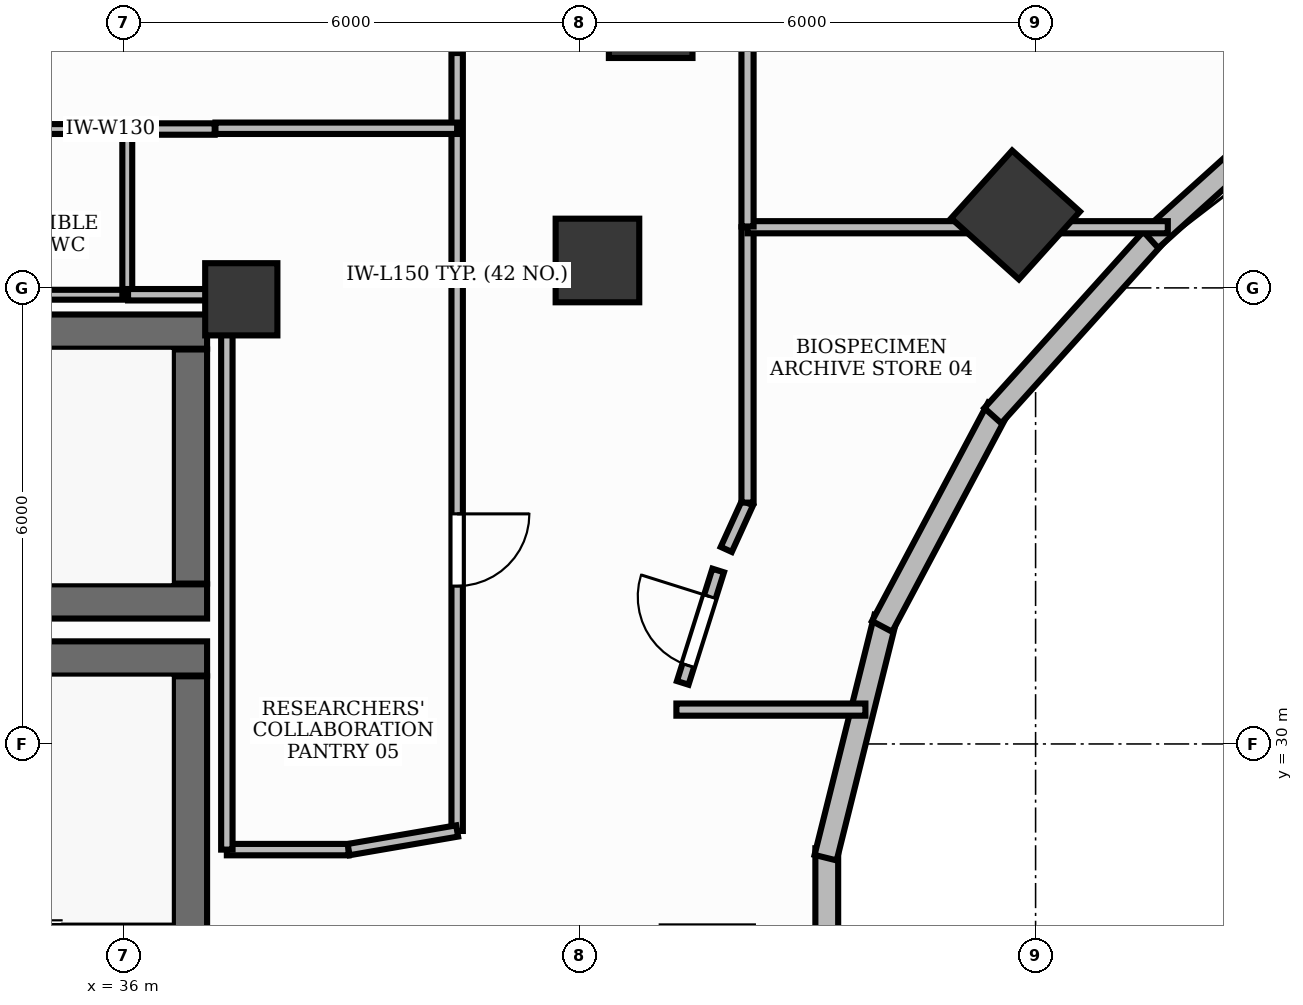
"""IFC4 building model, lengths in metres.
Left out: names, types, materials, properties, quantities, classifications, styles, units other than length and angle.
Written with IfcOpenShell. Run it as: python <this file> out.ifc"""

import sys

from ifc_helpers import new_model, si_unit, direction, frame, frame_2d, origin, origin_2d, place, context, subcontext, project, spatial, rectangle, extrude, element, fill, save


model = new_model("IFC4")
c1 = context("Model", 3, precision=1e-05, world=origin(), true_north=direction((0.0, 1.0)))
c2 = subcontext(c1, "Body", "Model", "MODEL_VIEW")
j1 = project(units=[si_unit("LENGTHUNIT", "METRE"), si_unit("PLANEANGLEUNIT", "RADIAN")], contexts=[c1])
p1 = place(None, origin())
s1 = spatial("IfcSite", under=j1, at=p1, CompositionType="ELEMENT")
p2 = place(p1, origin())
s2 = spatial("IfcBuilding", under=s1, at=p2, CompositionType="ELEMENT")
p3 = place(p2, frame((0.0, 0.0, 102.6)))
s3 = spatial("IfcBuildingStorey", under=s2, at=p3, CompositionType="ELEMENT", Elevation=102.6)
p4 = place(p3, frame((28.852, 35.425, 0.0), z_axis=(0.0, 0.0, 1.0), x_axis=(1.0, 0.0, 0.0)))
e1 = element("IfcWall", 1, at=p4, inside=s3, PredefinedType="SHEAR", context=c2, shape_type="SweptSolid", body=[
    extrude(rectangle(XDim=8.248, YDim=0.45, at=frame_2d((4.124, 0.0))), origin(), (0.0, 0.0, 1.0), 3.9),
])
p5 = place(p3, frame((28.35, 31.875, 0.0), z_axis=(0.0, 0.0, 1.0), x_axis=(1.0, 0.0, 0.0)))
e2 = element("IfcWall", 2, at=p5, inside=s3, PredefinedType="SHEAR", context=c2, shape_type="SweptSolid", body=[
    extrude(rectangle(XDim=8.75, YDim=0.45, at=frame_2d((4.375, 0.0))), origin(), (0.0, 0.0, 1.0), 3.9),
])
p6 = place(p3, frame((36.875, 32.11, 0.0), z_axis=(0.0, 0.0, 1.0), x_axis=(0.0, 1.0, 0.0)))
e3 = element("IfcWall", 3, at=p6, inside=s3, PredefinedType="SHEAR", context=c2, shape_type="SweptSolid", body=[
    extrude(rectangle(XDim=3.08, YDim=0.45, at=frame_2d((1.54, 0.0))), origin(), (0.0, 0.0, 1.0), 3.9),
])
p7 = place(p3, frame((33.1, 31.125, 0.0), z_axis=(0.0, 0.0, 1.0), x_axis=(1.0, 0.0, 0.0)))
e4 = element("IfcWall", 4, at=p7, inside=s3, PredefinedType="SHEAR", context=c2, shape_type="SweptSolid", body=[
    extrude(rectangle(XDim=4.0, YDim=0.45, at=frame_2d((2.0, 0.0))), origin(), (0.0, 0.0, 1.0), 3.9),
])
p8 = place(p3, frame((36.875, 23.11, 0.0), z_axis=(0.0, 0.0, 1.0), x_axis=(0.0, 1.0, 0.0)))
e5 = element("IfcWall", 5, at=p8, inside=s3, PredefinedType="SHEAR", context=c2, shape_type="SweptSolid", body=[
    extrude(rectangle(XDim=7.78, YDim=0.45, at=frame_2d((3.89, 0.0))), origin(), (0.0, 0.0, 1.0), 3.9),
])
p9 = place(p3, frame((37.55, 35.85, -0.0), z_axis=(0.0, 0.0, 1.0), x_axis=(1.0, 0.0, 0.0)))
e6 = element("IfcColumn", 6, at=p9, inside=s3, PredefinedType="PILASTER", context=c2, shape_type="SweptSolid", body=[
    extrude(rectangle(XDim=0.95, YDim=0.95, at=origin_2d()), origin(), (0.0, 0.0, 1.0), 3.901),
])
p10 = place(p3, frame((42.936, 39.575, -0.0), z_axis=(0.0, 0.0, 1.0), x_axis=(1.0, 0.0, 0.0)))
e7 = element("IfcColumn", 7, at=p10, inside=s3, PredefinedType="COLUMN", context=c2, shape_type="SweptSolid", body=[
    extrude(rectangle(XDim=1.1, YDim=1.1, at=origin_2d()), origin(), (0.0, 0.0, 1.0), 3.901),
])
p11 = place(p3, frame((47.736, 36.96, -0.0), z_axis=(0.0, 0.0, 1.0), x_axis=(0.669130606359, 0.743144825477, 0.0)))
e8 = element("IfcColumn", 8, at=p11, inside=s3, PredefinedType="COLUMN", context=c2, shape_type="SweptSolid", body=[
    extrude(rectangle(XDim=1.2, YDim=1.2, at=origin_2d()), origin(), (0.0, 0.0, 1.0), 3.901),
])
p12 = place(p3, frame((42.236, 36.361, -0.0), z_axis=(0.0, 0.0, 1.0), x_axis=(1.0, 0.0, 0.0)))
e9 = element("IfcColumn", 9, at=p12, inside=s3, PredefinedType="COLUMN", context=c2, shape_type="SweptSolid", body=[
    extrude(rectangle(XDim=1.1, YDim=1.1, at=origin_2d()), origin(), (0.0, 0.0, 1.0), 3.901),
])
p13 = place(p3, frame((45.253, 25.372, 0.0), z_axis=(0.0, 0.0, 1.0), x_axis=(0.0, 1.0, 0.0)))
e10 = element("IfcWall", 10, at=p13, inside=s3, PredefinedType="STANDARD", context=c2, shape_type="SweptSolid", body=[
    extrude(rectangle(XDim=3.255, YDim=0.3, at=frame_2d((1.628, 0.0))), origin(), (0.0, 0.0, 1.0), 3.9),
])
p14 = place(p3, frame((45.238, 28.504, 0.0), z_axis=(0.0, 0.0, 1.0), x_axis=(0.241900409149, 0.970301083197, 0.0)))
e11 = element("IfcWall", 11, at=p14, inside=s3, PredefinedType="STANDARD", context=c2, shape_type="SweptSolid", body=[
    extrude(rectangle(XDim=3.256, YDim=0.3, at=frame_2d((1.628, 0.0))), origin(), (0.0, 0.0, 1.0), 3.9),
])
p15 = place(p3, frame((45.98, 31.547, 0.0), z_axis=(0.0, 0.0, 1.0), x_axis=(0.469451284634, 0.882958374645, 0.0)))
e12 = element("IfcWall", 12, at=p15, inside=s3, PredefinedType="STANDARD", context=c2, shape_type="SweptSolid", body=[
    extrude(rectangle(XDim=3.256, YDim=0.3, at=frame_2d((1.628, 0.0))), origin(), (0.0, 0.0, 1.0), 3.9),
])
p16 = place(p3, frame((47.437, 34.319, 0.0), z_axis=(0.0, 0.0, 1.0), x_axis=(0.669167727967, 0.743111399353, 0.0)))
e13 = element("IfcWall", 13, at=p16, inside=s3, PredefinedType="STANDARD", context=c2, shape_type="SweptSolid", body=[
    extrude(rectangle(XDim=3.255, YDim=0.3, at=frame_2d((1.628, 0.0))), origin(), (0.0, 0.0, 1.0), 3.9),
])
p17 = place(p3, frame((49.513, 36.636, 0.0), z_axis=(0.0, 0.0, 1.0), x_axis=(0.74255963233, 0.669779958221, 0.0)))
e14 = element("IfcWall", 14, at=p17, inside=s3, PredefinedType="STANDARD", context=c2, shape_type="SweptSolid", body=[
    extrude(rectangle(XDim=3.539, YDim=0.3, at=frame_2d((1.77, 0.0))), origin(), (0.0, 0.0, 1.0), 3.9),
])
p18 = place(p3, frame((33.65, 38.09, 0.0), z_axis=(0.0, 0.0, 1.0), x_axis=(1.0, 0.0, 0.0)))
e15 = element("IfcWall", 15, at=p18, inside=s3, PredefinedType="PARTITIONING", context=c2, shape_type="SweptSolid", body=[
    extrude(rectangle(XDim=2.4, YDim=0.13, at=frame_2d((1.2, 0.0))), origin(), (0.0, 0.0, 1.0), 2.91),
])
p19 = place(p18, frame((0.24, 0.0, 0.0)))
e16 = element("IfcOpeningElement", 16, at=p19, cuts=e15, PredefinedType="OPENING", context=c2, shape_type="SweptSolid", body=[
    extrude(rectangle(XDim=0.9, YDim=2.15, at=frame_2d((0.45, 1.075))), frame((0.0, 0.08, 0.0), z_axis=(0.0, -1.0, 0.0), x_axis=(1.0, 0.0, 0.0)), (0.0, 0.0, 1.0), 0.16),
])
p20 = place(p3, frame((43.358, 30.803, 0.0), z_axis=(0.0, 0.0, 1.0), x_axis=(0.300641414783, 0.953737248783, 0.0)))
e17 = element("IfcWall", 17, at=p20, inside=s3, PredefinedType="PARTITIONING", context=c2, shape_type="SweptSolid", body=[
    extrude(rectangle(XDim=1.55, YDim=0.16, at=frame_2d((0.775, 0.0))), origin(), (0.0, 0.0, 1.0), 2.91),
])
p21 = place(p20, frame((0.24, 0.0, 0.0)))
e18 = element("IfcOpeningElement", 18, at=p21, cuts=e17, PredefinedType="OPENING", context=c2, shape_type="SweptSolid", body=[
    extrude(rectangle(XDim=0.95, YDim=2.15, at=frame_2d((0.475, 1.075))), frame((0.0, 0.095, 0.0), z_axis=(0.0, -1.0, 0.0), x_axis=(1.0, 0.0, 0.0)), (0.0, 0.0, 1.0), 0.19),
])
p22 = place(p3, frame((40.39, 39.09, 0.0), z_axis=(0.0, 0.0, 1.0), x_axis=(0.0, -1.0, 0.0)))
e19 = element("IfcWall", 19, at=p22, inside=s3, PredefinedType="PARTITIONING", context=c2, shape_type="SweptSolid", body=[
    extrude(rectangle(XDim=10.235, YDim=0.15, at=frame_2d((5.117, 0.0))), origin(), (0.0, 0.0, 1.0), 2.91),
])
p23 = place(p22, frame((6.063, 0.0, 0.0)))
e20 = element("IfcOpeningElement", 20, at=p23, cuts=e19, PredefinedType="OPENING", context=c2, shape_type="SweptSolid", body=[
    extrude(rectangle(XDim=0.95, YDim=2.15, at=frame_2d((0.475, 1.075))), frame((0.0, 0.09, 0.0), z_axis=(0.0, -1.0, 0.0), x_axis=(1.0, 0.0, 0.0)), (0.0, 0.0, 1.0), 0.18),
])
p24 = place(p3, frame((36.05, 35.91, 0.0), z_axis=(0.0, 0.0, 1.0), x_axis=(-1.0, 0.0, 0.0)))
e21 = element("IfcWall", 21, at=p24, inside=s3, PredefinedType="PARTITIONING", context=c2, shape_type="SweptSolid", body=[
    extrude(rectangle(XDim=2.4, YDim=0.13, at=frame_2d((1.2, 0.0))), origin(), (0.0, 0.0, 1.0), 2.91),
])
p25 = place(p3, frame((36.05, 38.09, 0.0), z_axis=(0.0, 0.0, 1.0), x_axis=(0.0, -1.0, 0.0)))
e22 = element("IfcWall", 22, at=p25, inside=s3, PredefinedType="PARTITIONING", context=c2, shape_type="SweptSolid", body=[
    extrude(rectangle(XDim=2.18, YDim=0.13, at=frame_2d((1.09, 0.0))), origin(), (0.0, 0.0, 1.0), 2.91),
])
p26 = place(p3, frame((45.761, 30.452, 0.0), z_axis=(0.0, 0.0, 1.0), x_axis=(-1.0, 0.0, 0.0)))
e23 = element("IfcWall", 23, at=p26, inside=s3, PredefinedType="PARTITIONING", context=c2, shape_type="SweptSolid", body=[
    extrude(rectangle(XDim=2.487, YDim=0.16, at=frame_2d((1.243, 0.0))), origin(), (0.0, 0.0, 1.0), 2.91),
])
p27 = place(p3, frame((43.93, 32.559, 0.0), z_axis=(0.0, 0.0, 1.0), x_axis=(0.414377467152, 0.910105111905, 0.0)))
e24 = element("IfcWall", 24, at=p27, inside=s3, PredefinedType="PARTITIONING", context=c2, shape_type="SweptSolid", body=[
    extrude(rectangle(XDim=0.672, YDim=0.16, at=frame_2d((0.336, 0.0))), origin(), (0.0, 0.0, 1.0), 2.91),
])
p28 = place(p3, frame((44.21, 33.175, 0.0), z_axis=(0.0, 0.0, 1.0), x_axis=(0.0, 1.0, 0.0)))
e25 = element("IfcWall", 25, at=p28, inside=s3, PredefinedType="PARTITIONING", context=c2, shape_type="SweptSolid", body=[
    extrude(rectangle(XDim=3.623, YDim=0.16, at=frame_2d((1.812, 0.0))), origin(), (0.0, 0.0, 1.0), 2.91),
])
p29 = place(p3, frame((44.21, 36.798, 0.0), z_axis=(0.0, 0.0, 1.0), x_axis=(1.0, 0.0, 0.0)))
e26 = element("IfcWall", 26, at=p29, inside=s3, PredefinedType="PARTITIONING", context=c2, shape_type="SweptSolid", body=[
    extrude(rectangle(XDim=5.53, YDim=0.16, at=frame_2d((2.765, 0.0))), origin(), (0.0, 0.0, 1.0), 2.91),
])
p30 = place(p3, frame((38.962, 28.61, 0.0), z_axis=(0.0, 0.0, 1.0), x_axis=(-1.0, 0.0, 0.0)))
e27 = element("IfcWall", 27, at=p30, inside=s3, PredefinedType="PARTITIONING", context=c2, shape_type="SweptSolid", body=[
    extrude(rectangle(XDim=1.602, YDim=0.15, at=frame_2d((0.801, 0.0))), origin(), (0.0, 0.0, 1.0), 2.91),
])
p31 = place(p3, frame((37.36, 28.61, 0.0), z_axis=(0.0, 0.0, 1.0), x_axis=(0.0, 1.0, 0.0)))
e28 = element("IfcWall", 28, at=p31, inside=s3, PredefinedType="PARTITIONING", context=c2, shape_type="SweptSolid", body=[
    extrude(rectangle(XDim=7.29, YDim=0.15, at=frame_2d((3.645, 0.0))), origin(), (0.0, 0.0, 1.0), 2.91),
])
p32 = place(p3, frame((37.35, 35.91, 0.0), z_axis=(0.0, 0.0, 1.0), x_axis=(-1.0, 0.0, 0.0)))
e29 = element("IfcWall", 29, at=p32, inside=s3, PredefinedType="PARTITIONING", context=c2, shape_type="SweptSolid", body=[
    extrude(rectangle(XDim=1.29, YDim=0.15, at=frame_2d((0.645, 0.0))), origin(), (0.0, 0.0, 1.0), 2.91),
])
p33 = place(p3, frame((36.06, 38.09, 0.0), z_axis=(0.0, 0.0, 1.0), x_axis=(1.0, 0.0, 0.0)))
e30 = element("IfcWall", 30, at=p33, inside=s3, PredefinedType="PARTITIONING", context=c2, shape_type="SweptSolid", body=[
    extrude(rectangle(XDim=1.14, YDim=0.15, at=frame_2d((0.57, 0.0))), origin(), (0.0, 0.0, 1.0), 2.91),
])
p34 = place(p3, frame((37.21, 38.1, 0.0), z_axis=(0.0, 0.0, 1.0), x_axis=(1.0, 0.0, 0.0)))
e31 = element("IfcWall", 31, at=p34, inside=s3, PredefinedType="PARTITIONING", context=c2, shape_type="SweptSolid", body=[
    extrude(rectangle(XDim=3.18, YDim=0.15, at=frame_2d((1.59, 0.0))), origin(), (0.0, 0.0, 1.0), 2.91),
])
p35 = place(p3, frame((40.39, 28.855, 0.0), z_axis=(0.0, 0.0, 1.0), x_axis=(-0.985557240647, -0.169342627261, 0.0)))
e32 = element("IfcWall", 32, at=p35, inside=s3, PredefinedType="PARTITIONING", context=c2, shape_type="SweptSolid", body=[
    extrude(rectangle(XDim=1.449, YDim=0.15, at=frame_2d((0.725, 0.0))), origin(), (0.0, 0.0, 1.0), 2.91),
])
p36 = place(p3, frame((44.21, 36.808, 0.0), z_axis=(0.0, 0.0, 1.0), x_axis=(0.0, 1.0, 0.0)))
e33 = element("IfcWall", 33, at=p36, inside=s3, PredefinedType="PARTITIONING", context=c2, shape_type="SweptSolid", body=[
    extrude(rectangle(XDim=6.592, YDim=0.16, at=frame_2d((3.296, 0.0))), origin(), (0.0, 0.0, 1.0), 2.91),
])
p37 = place(p21, origin())
e34 = element("IfcDoor", 34, at=p37, inside=s3, OperationType="SINGLE_SWING_RIGHT", PredefinedType="DOOR", context=c2, shape_type="SweptSolid", body=[
    extrude(rectangle(XDim=0.95, YDim=2.15, at=frame_2d((0.475, 1.075))), frame((0.0, 0.025, 0.0), z_axis=(0.0, -1.0, 0.0), x_axis=(1.0, 0.0, 0.0)), (0.0, 0.0, 1.0), 0.05),
])
fill(e18, e34)
p38 = place(p23, origin())
e35 = element("IfcDoor", 35, at=p38, inside=s3, OperationType="SINGLE_SWING_LEFT", PredefinedType="DOOR", context=c2, shape_type="SweptSolid", body=[
    extrude(rectangle(XDim=0.95, YDim=2.15, at=frame_2d((0.475, 1.075))), frame((0.0, 0.025, 0.0), z_axis=(0.0, -1.0, 0.0), x_axis=(1.0, 0.0, 0.0)), (0.0, 0.0, 1.0), 0.05),
])
fill(e20, e35)
save(model, sys.argv[1])
